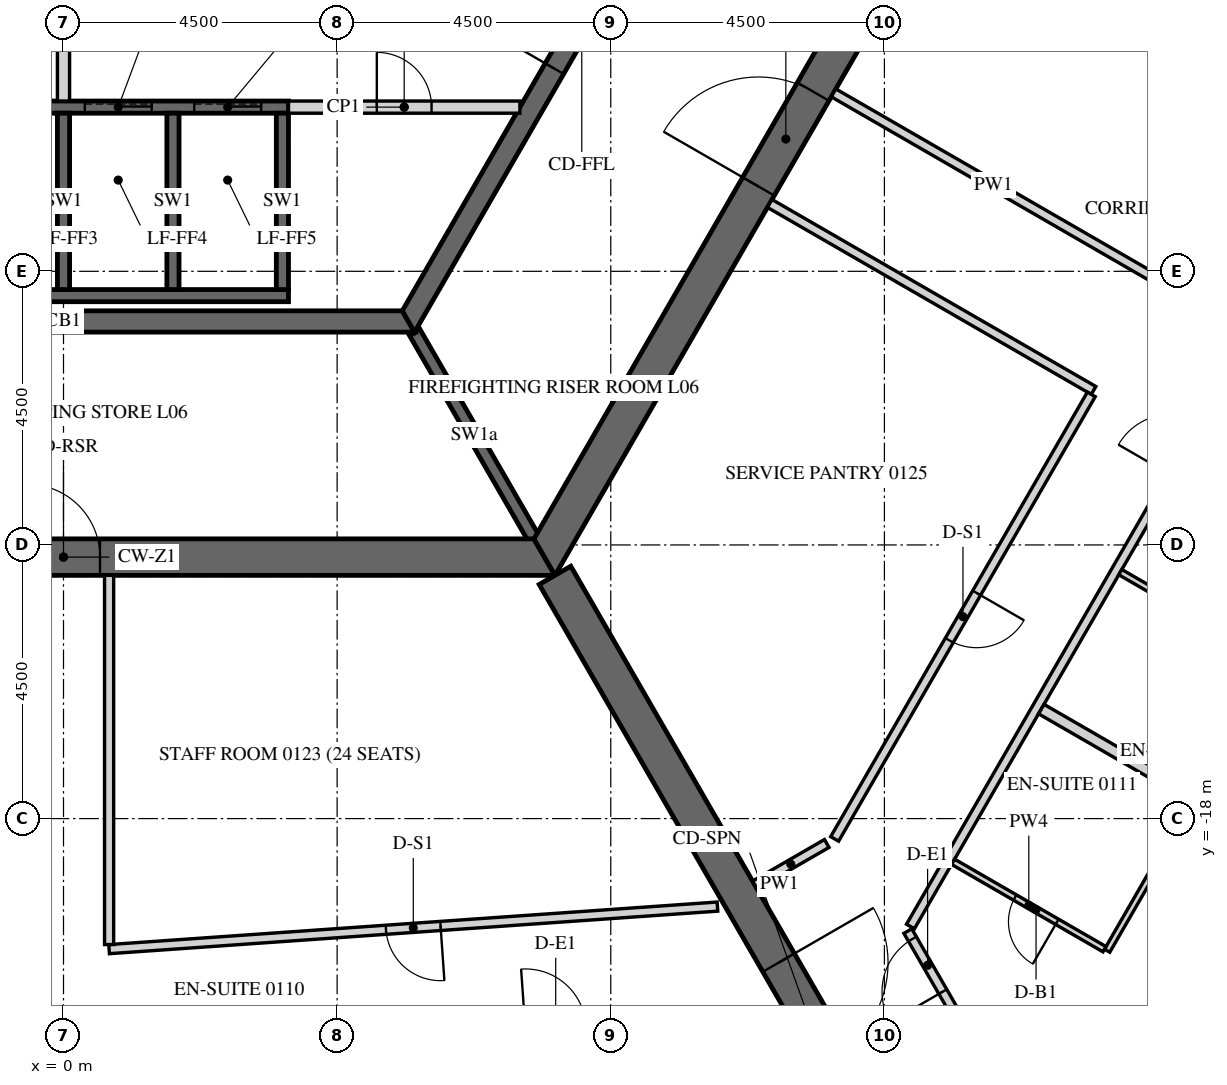
"""IFC4 building model, lengths in metres.
Left out: names, types, materials, properties, quantities, classifications, styles, units other than length and angle.
Written with IfcOpenShell. Run it as: python <this file> out.ifc"""

import sys

from ifc_helpers import new_model, si_unit, direction, frame, frame_2d, origin, place, context, subcontext, project, spatial, polyline, rectangle, outline, extrude, element, fill, save


model = new_model("IFC4")
c1 = context("Model", 3, precision=1e-05, world=origin(), true_north=direction((0.0, 1.0)))
c2 = subcontext(c1, "Body", "Model", "MODEL_VIEW")
j1 = project(units=[si_unit("LENGTHUNIT", "METRE"), si_unit("PLANEANGLEUNIT", "RADIAN")], contexts=[c1])
p1 = place(None, origin())
s1 = spatial("IfcSite", under=j1, at=p1, CompositionType="ELEMENT")
p2 = place(p1, origin())
s2 = spatial("IfcBuilding", under=s1, at=p2, CompositionType="ELEMENT")
p3 = place(p2, frame((0.0, 0.0, 37.5)))
s3 = spatial("IfcBuildingStorey", under=s2, at=p3, CompositionType="ELEMENT", Elevation=37.5)
p4 = place(p3, frame((-7.91, -13.7, -0.15), z_axis=(0.0, 0.0, 1.0), x_axis=(1.0, 0.0, 0.0)))
e1 = element("IfcWall", 1, at=p4, inside=s3, PredefinedType="SHEAR", context=c2, shape_type="SweptSolid", body=[
    extrude(outline(polyline([(-0.173, -0.3), (15.993, -0.3), (15.646, 0.3), (0.173, 0.3), (-0.173, -0.3)])), origin(), (0.0, 0.0, 1.0), 3.9),
])
p5 = place(p4, frame((7.31, 0.0, 0.15)))
e2 = element("IfcOpeningElement", 2, at=p5, cuts=e1, PredefinedType="OPENING", context=c2, shape_type="SweptSolid", body=[
    extrude(rectangle(XDim=1.2, YDim=2.4, at=frame_2d((0.6, 1.2))), frame((0.0, 0.31, 0.0), z_axis=(0.0, -1.0, 0.0), x_axis=(1.0, 0.0, 0.0)), (0.0, 0.0, 1.0), 0.62),
])
p6 = place(p3, frame((7.91, -13.7, -0.15), z_axis=(0.0, 0.0, 1.0), x_axis=(0.499999880136, 0.866025472988, 0.0)))
e3 = element("IfcWall", 3, at=p6, inside=s3, PredefinedType="SHEAR", context=c2, shape_type="SweptSolid", body=[
    extrude(outline(polyline([(-0.173, -0.3), (15.993, -0.3), (15.646, 0.3), (0.173, 0.3), (-0.173, -0.3)])), origin(), (0.0, 0.0, 1.0), 3.9),
])
p7 = place(p6, frame((7.039, 0.0, 0.15)))
e4 = element("IfcOpeningElement", 4, at=p7, cuts=e3, PredefinedType="OPENING", context=c2, shape_type="SweptSolid", body=[
    extrude(rectangle(XDim=1.8, YDim=2.4, at=frame_2d((0.9, 1.2))), frame((0.0, 0.31, 0.0), z_axis=(0.0, -1.0, 0.0), x_axis=(1.0, 0.0, 0.0)), (0.0, 0.0, 1.0), 0.62),
])
p8 = place(p3, frame((8.083, -14.0, -0.15), z_axis=(0.0, 0.0, 1.0), x_axis=(0.499997680643, -0.866026742862, 0.0)))
e5 = element("IfcWall", 5, at=p8, inside=s3, PredefinedType="SHEAR", context=c2, shape_type="SweptSolid", body=[
    extrude(rectangle(XDim=16.509, YDim=0.6, at=frame_2d((8.254, 0.0))), origin(), (0.0, 0.0, 1.0), 3.9),
])
p9 = place(p8, frame((7.354, 0.0, 0.15)))
e6 = element("IfcOpeningElement", 6, at=p9, cuts=e5, PredefinedType="OPENING", context=c2, shape_type="SweptSolid", body=[
    extrude(rectangle(XDim=1.8, YDim=2.4, at=frame_2d((0.9, 1.2))), frame((0.0, 0.31, 0.0), z_axis=(0.0, -1.0, 0.0), x_axis=(1.0, 0.0, 0.0)), (0.0, 0.0, 1.0), 0.62),
])
p10 = place(p3, frame((-5.673, -9.825, -0.15), z_axis=(0.0, 0.0, 1.0), x_axis=(1.0, 0.0, 0.0)))
e7 = element("IfcWall", 7, at=p10, inside=s3, PredefinedType="SHEAR", context=c2, shape_type="SweptSolid", body=[
    extrude(outline(polyline([(-0.101, -0.175), (11.446, -0.175), (11.244, 0.175), (0.101, 0.175), (-0.101, -0.175)])), origin(), (0.0, 0.0, 1.0), 3.9),
])
p11 = place(p3, frame((5.673, -9.825, -0.15), z_axis=(0.0, 0.0, 1.0), x_axis=(0.499995046907, 0.866028263435, 0.0)))
e8 = element("IfcWall", 8, at=p11, inside=s3, PredefinedType="SHEAR", context=c2, shape_type="SweptSolid", body=[
    extrude(outline(polyline([(-0.101, -0.175), (11.446, -0.175), (11.244, 0.175), (0.101, 0.175), (-0.101, -0.175)])), origin(), (0.0, 0.0, 1.0), 3.9),
])
p12 = place(p11, frame((4.801, 0.0, 0.15)))
e9 = element("IfcOpeningElement", 9, at=p12, cuts=e8, PredefinedType="OPENING", context=c2, shape_type="SweptSolid", body=[
    extrude(rectangle(XDim=1.8, YDim=2.4, at=frame_2d((0.9, 1.2))), frame((0.0, 0.185, 0.0), z_axis=(0.0, -1.0, 0.0), x_axis=(1.0, 0.0, 0.0)), (0.0, 0.0, 1.0), 0.37),
])
p13 = place(p3, frame((-5.5, -6.3, -0.25), z_axis=(0.0, 0.0, 1.0), x_axis=(1.0, 0.0, 0.0)))
e10 = element("IfcWall", 10, at=p13, inside=s3, PredefinedType="SHEAR", context=c2, shape_type="SweptSolid", body=[
    extrude(rectangle(XDim=9.2, YDim=0.2, at=frame_2d((4.6, 0.0))), origin(), (0.0, 0.0, 1.0), 3.9),
])
p14 = place(p13, frame((0.45, 0.0, 0.25)))
e11 = element("IfcOpeningElement", 11, at=p14, cuts=e10, PredefinedType="OPENING", context=c2, shape_type="SweptSolid", body=[
    extrude(rectangle(XDim=1.1, YDim=2.1, at=frame_2d((0.55, 1.05))), frame((0.0, 0.11, 0.0), z_axis=(0.0, -1.0, 0.0), x_axis=(1.0, 0.0, 0.0)), (0.0, 0.0, 1.0), 0.22),
])
p15 = place(p13, frame((2.25, 0.0, 0.25)))
e12 = element("IfcOpeningElement", 12, at=p15, cuts=e10, PredefinedType="OPENING", context=c2, shape_type="SweptSolid", body=[
    extrude(rectangle(XDim=1.1, YDim=2.1, at=frame_2d((0.55, 1.05))), frame((0.0, 0.11, 0.0), z_axis=(0.0, -1.0, 0.0), x_axis=(1.0, 0.0, 0.0)), (0.0, 0.0, 1.0), 0.22),
])
p16 = place(p13, frame((4.05, 0.0, 0.25)))
e13 = element("IfcOpeningElement", 13, at=p16, cuts=e10, PredefinedType="OPENING", context=c2, shape_type="SweptSolid", body=[
    extrude(rectangle(XDim=1.1, YDim=2.1, at=frame_2d((0.55, 1.05))), frame((0.0, 0.11, 0.0), z_axis=(0.0, -1.0, 0.0), x_axis=(1.0, 0.0, 0.0)), (0.0, 0.0, 1.0), 0.22),
])
p17 = place(p13, frame((5.85, 0.0, 0.25)))
e14 = element("IfcOpeningElement", 14, at=p17, cuts=e10, PredefinedType="OPENING", context=c2, shape_type="SweptSolid", body=[
    extrude(rectangle(XDim=1.1, YDim=2.1, at=frame_2d((0.55, 1.05))), frame((0.0, 0.11, 0.0), z_axis=(0.0, -1.0, 0.0), x_axis=(1.0, 0.0, 0.0)), (0.0, 0.0, 1.0), 0.22),
])
p18 = place(p13, frame((7.65, 0.0, 0.25)))
e15 = element("IfcOpeningElement", 15, at=p18, cuts=e10, PredefinedType="OPENING", context=c2, shape_type="SweptSolid", body=[
    extrude(rectangle(XDim=1.1, YDim=2.1, at=frame_2d((0.55, 1.05))), frame((0.0, 0.11, 0.0), z_axis=(0.0, -1.0, 0.0), x_axis=(1.0, 0.0, 0.0)), (0.0, 0.0, 1.0), 0.22),
])
p19 = place(p3, frame((-5.5, -9.4, -0.25), z_axis=(0.0, 0.0, 1.0), x_axis=(1.0, 0.0, 0.0)))
e16 = element("IfcWall", 16, at=p19, inside=s3, PredefinedType="SHEAR", context=c2, shape_type="SweptSolid", body=[
    extrude(rectangle(XDim=9.2, YDim=0.2, at=frame_2d((4.6, 0.0))), origin(), (0.0, 0.0, 1.0), 3.9),
])
for number, where, z_axis, x_axis in (
    (17, (0.0, -9.3, -0.25), (0.0, 0.0, 1.0), (0.0, 1.0, 0.0)),
    (18, (1.8, -9.3, -0.25), (0.0, 0.0, 1.0), (0.0, 1.0, 0.0)),
    (19, (3.6, -9.3, -0.25), (0.0, 0.0, 1.0), (0.0, 1.0, 0.0)),
):
    element("IfcWall", number, at=place(p3, frame(where, z_axis=z_axis, x_axis=x_axis)), inside=s3, PredefinedType="SHEAR", context=c2, shape_type="SweptSolid", body=[
        extrude(rectangle(XDim=2.9, YDim=0.2, at=frame_2d((1.45, 0.0))), origin(), (0.0, 0.0, 1.0), 3.9),
    ])
p20 = place(p3, frame((0.0, -6.2, 0.0), z_axis=(0.0, 0.0, 1.0), x_axis=(0.0, 1.0, 0.0)))
e20 = element("IfcWall", 20, at=p20, inside=s3, PredefinedType="PARTITIONING", context=c2, shape_type="SweptSolid", body=[
    extrude(rectangle(XDim=6.1, YDim=0.2, at=frame_2d((3.05, 0.0))), origin(), (0.0, 0.0, 1.0), 3.65),
])
p21 = place(p3, frame((3.7, -6.3, 0.0), z_axis=(0.0, 0.0, 1.0), x_axis=(1.0, 0.0, 0.0)))
e21 = element("IfcWall", 21, at=p21, inside=s3, PredefinedType="PARTITIONING", context=c2, shape_type="SweptSolid", body=[
    extrude(rectangle(XDim=3.806, YDim=0.2, at=frame_2d((1.903, 0.0))), origin(), (0.0, 0.0, 1.0), 3.65),
])
p22 = place(p21, frame((1.453, 0.0, 0.0)))
e22 = element("IfcOpeningElement", 22, at=p22, cuts=e21, PredefinedType="OPENING", context=c2, shape_type="SweptSolid", body=[
    extrude(rectangle(XDim=0.9, YDim=2.1, at=frame_2d((0.45, 1.05))), frame((0.0, 0.11, 0.0), z_axis=(0.0, -1.0, 0.0), x_axis=(1.0, 0.0, 0.0)), (0.0, 0.0, 1.0), 0.22),
])
p23 = place(p3, frame((5.773, -10.0, -0.15), z_axis=(0.0, 0.0, 1.0), x_axis=(0.500038251005, -0.86600331843, 0.0)))
e23 = element("IfcWall", 23, at=p23, inside=s3, PredefinedType="SHEAR", context=c2, shape_type="SweptSolid", body=[
    extrude(rectangle(XDim=3.926, YDim=0.2, at=frame_2d((1.963, 0.0))), origin(), (0.0, 0.0, 1.0), 3.9),
])
p24 = place(p3, frame((10.754, -19.447, 0.0), z_axis=(0.0, 0.0, 1.0), x_axis=(-0.997564830966, -0.069745308232, 0.0)))
e24 = element("IfcWall", 24, at=p24, inside=s3, PredefinedType="PARTITIONING", context=c2, shape_type="SweptSolid", body=[
    extrude(rectangle(XDim=10.029, YDim=0.15, at=frame_2d((5.014, 0.0))), origin(), (0.0, 0.0, 1.0), 2.988),
])
p25 = place(p24, frame((4.564, 0.0, 0.0)))
e25 = element("IfcOpeningElement", 25, at=p25, cuts=e24, PredefinedType="OPENING", context=c2, shape_type="SweptSolid", body=[
    extrude(rectangle(XDim=0.9, YDim=2.1, at=frame_2d((0.45, 1.05))), frame((0.0, 0.085, 0.0), z_axis=(0.0, -1.0, 0.0), x_axis=(1.0, 0.0, 0.0)), (0.0, 0.0, 1.0), 0.17),
])
p26 = place(p3, frame((0.75, -20.072, 0.0), z_axis=(0.0, 0.0, 1.0), x_axis=(0.0, 1.0, 0.0)))
e26 = element("IfcWall", 26, at=p26, inside=s3, PredefinedType="PARTITIONING", context=c2, shape_type="SweptSolid", body=[
    extrude(rectangle(XDim=6.072, YDim=0.15, at=frame_2d((3.036, 0.0))), origin(), (0.0, 0.0, 1.0), 2.988),
])
p27 = place(p3, frame((15.441, -22.545, 0.0), z_axis=(0.0, 0.0, 1.0), x_axis=(-0.500037089193, 0.86600398927, 0.0)))
e27 = element("IfcWall", 27, at=p27, inside=s3, PredefinedType="PARTITIONING", context=c2, shape_type="SweptSolid", body=[
    extrude(rectangle(XDim=3.112, YDim=0.15, at=frame_2d((1.556, 0.0))), origin(), (0.0, 0.0, 1.0), 2.988),
])
p28 = place(p27, frame((1.962, 0.0, 0.0)))
e28 = element("IfcOpeningElement", 28, at=p28, cuts=e27, PredefinedType="OPENING", context=c2, shape_type="SweptSolid", body=[
    extrude(rectangle(XDim=1.0, YDim=2.1, at=frame_2d((0.5, 1.05))), frame((0.0, 0.085, 0.0), z_axis=(0.0, -1.0, 0.0), x_axis=(1.0, 0.0, 0.0)), (0.0, 0.0, 1.0), 0.17),
])
p29 = place(p3, frame((13.928, -19.775, 0.0), z_axis=(0.0, 0.0, 1.0), x_axis=(0.50000450071, 0.866022805283, 0.0)))
e29 = element("IfcWall", 29, at=p29, inside=s3, PredefinedType="PARTITIONING", context=c2, shape_type="SweptSolid", body=[
    extrude(rectangle(XDim=23.877, YDim=0.15, at=frame_2d((11.938, 0.0))), origin(), (0.0, 0.0, 1.0), 2.988),
])
p30 = place(p29, frame((8.573, 0.0, 0.0)))
e30 = element("IfcOpeningElement", 30, at=p30, cuts=e29, PredefinedType="OPENING", context=c2, shape_type="SweptSolid", body=[
    extrude(rectangle(XDim=1.0, YDim=2.1, at=frame_2d((0.5, 1.05))), frame((0.0, 0.085, 0.0), z_axis=(0.0, -1.0, 0.0), x_axis=(1.0, 0.0, 0.0)), (0.0, 0.0, 1.0), 0.17),
])
p31 = place(p29, frame((13.022, 0.0, 0.0)))
e31 = element("IfcOpeningElement", 31, at=p31, cuts=e29, PredefinedType="OPENING", context=c2, shape_type="SweptSolid", body=[
    extrude(rectangle(XDim=1.0, YDim=2.1, at=frame_2d((0.5, 1.05))), frame((0.0, 0.085, 0.0), z_axis=(0.0, -1.0, 0.0), x_axis=(1.0, 0.0, 0.0)), (0.0, 0.0, 1.0), 0.17),
])
p32 = place(p29, frame((21.925, 0.0, 0.0)))
e32 = element("IfcOpeningElement", 32, at=p32, cuts=e29, PredefinedType="OPENING", context=c2, shape_type="SweptSolid", body=[
    extrude(rectangle(XDim=1.0, YDim=2.1, at=frame_2d((0.5, 1.05))), frame((0.0, 0.085, 0.0), z_axis=(0.0, -1.0, 0.0), x_axis=(1.0, 0.0, 0.0)), (0.0, 0.0, 1.0), 0.17),
])
p33 = place(p3, frame((17.925, -9.103, 0.0), z_axis=(0.0, 0.0, 1.0), x_axis=(-0.866013586754, 0.500020467139, 0.0)))
e33 = element("IfcWall", 33, at=p33, inside=s3, PredefinedType="PARTITIONING", context=c2, shape_type="SweptSolid", body=[
    extrude(rectangle(XDim=6.075, YDim=0.15, at=frame_2d((3.038, 0.0))), origin(), (0.0, 0.0, 1.0), 2.988),
])
p34 = place(p3, frame((11.614, -7.884, 0.0), z_axis=(0.0, 0.0, 1.0), x_axis=(0.866033542371, -0.499985903289, 0.0)))
e34 = element("IfcWall", 34, at=p34, inside=s3, PredefinedType="PARTITIONING", context=c2, shape_type="SweptSolid", body=[
    extrude(rectangle(XDim=6.15, YDim=0.15, at=frame_2d((3.075, 0.0))), origin(), (0.0, 0.0, 1.0), 2.988),
])
p35 = place(p3, frame((16.902, -11.024, 0.0), z_axis=(0.0, 0.0, 1.0), x_axis=(-0.499999527968, -0.866025676312, 0.0)))
e35 = element("IfcWall", 35, at=p35, inside=s3, PredefinedType="PARTITIONING", context=c2, shape_type="SweptSolid", body=[
    extrude(rectangle(XDim=8.441, YDim=0.15, at=frame_2d((4.22, 0.0))), origin(), (0.0, 0.0, 1.0), 2.988),
])
p36 = place(p35, frame((3.771, 0.0, 0.0)))
e36 = element("IfcOpeningElement", 36, at=p36, cuts=e35, PredefinedType="OPENING", context=c2, shape_type="SweptSolid", body=[
    extrude(rectangle(XDim=0.9, YDim=2.1, at=frame_2d((0.45, 1.05))), frame((0.0, 0.085, 0.0), z_axis=(0.0, -1.0, 0.0), x_axis=(1.0, 0.0, 0.0)), (0.0, 0.0, 1.0), 0.17),
])
p37 = place(p3, frame((12.552, -18.409, 0.0), z_axis=(0.0, 0.0, 1.0), x_axis=(-0.866078408764, -0.499908181442, 0.0)))
e37 = element("IfcWall", 37, at=p37, inside=s3, PredefinedType="PARTITIONING", context=c2, shape_type="SweptSolid", body=[
    extrude(rectangle(XDim=1.365, YDim=0.15, at=frame_2d((0.683, 0.0))), origin(), (0.0, 0.0, 1.0), 2.988),
])
p38 = place(p3, frame((18.568, -17.74, 0.0), z_axis=(0.0, 0.0, 1.0), x_axis=(-0.499998209175, -0.866026437715, 0.0)))
e38 = element("IfcWall", 38, at=p38, inside=s3, PredefinedType="PARTITIONING", context=c2, shape_type="SweptSolid", body=[
    extrude(rectangle(XDim=2.81, YDim=0.1, at=frame_2d((1.405, 0.0))), origin(), (0.0, 0.0, 1.0), 2.988),
])
p39 = place(p3, frame((17.12, -20.148, 0.0), z_axis=(0.0, 0.0, 1.0), x_axis=(-0.866039941686, 0.499974818771, 0.0)))
e39 = element("IfcWall", 39, at=p39, inside=s3, PredefinedType="PARTITIONING", context=c2, shape_type="SweptSolid", body=[
    extrude(rectangle(XDim=2.875, YDim=0.1, at=frame_2d((1.438, 0.0))), origin(), (0.0, 0.0, 1.0), 2.988),
])
p40 = place(p39, frame((0.9, 0.0, 0.0)))
e40 = element("IfcOpeningElement", 40, at=p40, cuts=e39, PredefinedType="OPENING", context=c2, shape_type="SweptSolid", body=[
    extrude(rectangle(XDim=0.8, YDim=2.1, at=frame_2d((0.4, 1.05))), frame((0.0, 0.06, 0.0), z_axis=(0.0, -1.0, 0.0), x_axis=(1.0, 0.0, 0.0)), (0.0, 0.0, 1.0), 0.12),
])
p41 = place(p3, frame((22.51, -19.912, 0.0), z_axis=(0.0, 0.0, 1.0), x_axis=(-0.866014745021, 0.500018461065, 0.0)))
e41 = element("IfcWall", 41, at=p41, inside=s3, PredefinedType="PARTITIONING", context=c2, shape_type="SweptSolid", body=[
    extrude(rectangle(XDim=7.425, YDim=0.18, at=frame_2d((3.712, 0.0))), origin(), (0.0, 0.0, 1.0), 2.988),
])
p42 = place(p3, frame((17.38, -13.948, 0.0), z_axis=(0.0, 0.0, 1.0), x_axis=(0.866039067339, -0.499976333282, 0.0)))
e42 = element("IfcWall", 42, at=p42, inside=s3, PredefinedType="PARTITIONING", context=c2, shape_type="SweptSolid", body=[
    extrude(rectangle(XDim=2.525, YDim=0.1, at=frame_2d((1.262, 0.0))), origin(), (0.0, 0.0, 1.0), 2.988),
])
p43 = place(p42, frame((0.955, 0.0, 0.0)))
e43 = element("IfcOpeningElement", 43, at=p43, cuts=e42, PredefinedType="OPENING", context=c2, shape_type="SweptSolid", body=[
    extrude(rectangle(XDim=0.8, YDim=2.1, at=frame_2d((0.4, 1.05))), frame((0.0, 0.06, 0.0), z_axis=(0.0, -1.0, 0.0), x_axis=(1.0, 0.0, 0.0)), (0.0, 0.0, 1.0), 0.12),
])
p44 = place(p7, origin())
e44 = element("IfcDoor", 44, at=p44, inside=s3, OperationType="DOUBLE_DOOR_SINGLE_SWING", PredefinedType="DOOR", context=c2, shape_type="SweptSolid", body=[
    extrude(rectangle(XDim=1.8, YDim=2.4, at=frame_2d((0.9, 1.2))), frame((0.0, 0.025, 0.0), z_axis=(0.0, -1.0, 0.0), x_axis=(1.0, 0.0, 0.0)), (0.0, 0.0, 1.0), 0.05),
])
fill(e4, e44)
p45 = place(p5, origin())
e45 = element("IfcDoor", 45, at=p45, inside=s3, OperationType="SINGLE_SWING_LEFT", PredefinedType="DOOR", context=c2, shape_type="SweptSolid", body=[
    extrude(rectangle(XDim=1.2, YDim=2.4, at=frame_2d((0.6, 1.2))), frame((0.0, 0.025, 0.0), z_axis=(0.0, -1.0, 0.0), x_axis=(1.0, 0.0, 0.0)), (0.0, 0.0, 1.0), 0.05),
])
fill(e2, e45)
p46 = place(p9, origin())
e46 = element("IfcDoor", 46, at=p46, inside=s3, OperationType="DOUBLE_DOOR_SINGLE_SWING", PredefinedType="DOOR", context=c2, shape_type="SweptSolid", body=[
    extrude(rectangle(XDim=1.8, YDim=2.4, at=frame_2d((0.9, 1.2))), frame((0.0, 0.025, 0.0), z_axis=(0.0, -1.0, 0.0), x_axis=(1.0, 0.0, 0.0)), (0.0, 0.0, 1.0), 0.05),
])
fill(e6, e46)
p47 = place(p12, origin())
e47 = element("IfcDoor", 47, at=p47, inside=s3, OperationType="DOUBLE_DOOR_SINGLE_SWING", PredefinedType="DOOR", context=c2, shape_type="SweptSolid", body=[
    extrude(rectangle(XDim=1.8, YDim=2.4, at=frame_2d((0.9, 1.2))), frame((0.0, 0.025, 0.0), z_axis=(0.0, -1.0, 0.0), x_axis=(1.0, 0.0, 0.0)), (0.0, 0.0, 1.0), 0.05),
])
fill(e9, e47)
p48 = place(p22, origin())
e48 = element("IfcDoor", 48, at=p48, inside=s3, OperationType="SINGLE_SWING_LEFT", PredefinedType="DOOR", context=c2, shape_type="SweptSolid", body=[
    extrude(rectangle(XDim=0.9, YDim=2.1, at=frame_2d((0.45, 1.05))), frame((0.0, 0.025, 0.0), z_axis=(0.0, -1.0, 0.0), x_axis=(1.0, 0.0, 0.0)), (0.0, 0.0, 1.0), 0.05),
])
fill(e22, e48)
p49 = place(p17, origin())
e49 = element("IfcDoor", 49, at=p49, inside=s3, OperationType="SLIDING_TO_LEFT", PredefinedType="DOOR", context=c2, shape_type="SweptSolid", body=[
    extrude(rectangle(XDim=1.1, YDim=2.1, at=frame_2d((0.55, 1.05))), frame((0.0, 0.025, 0.0), z_axis=(0.0, -1.0, 0.0), x_axis=(1.0, 0.0, 0.0)), (0.0, 0.0, 1.0), 0.05),
])
fill(e14, e49)
p50 = place(p18, origin())
e50 = element("IfcDoor", 50, at=p50, inside=s3, OperationType="SLIDING_TO_LEFT", PredefinedType="DOOR", context=c2, shape_type="SweptSolid", body=[
    extrude(rectangle(XDim=1.1, YDim=2.1, at=frame_2d((0.55, 1.05))), frame((0.0, 0.025, 0.0), z_axis=(0.0, -1.0, 0.0), x_axis=(1.0, 0.0, 0.0)), (0.0, 0.0, 1.0), 0.05),
])
fill(e15, e50)
p51 = place(p28, origin())
e51 = element("IfcDoor", 51, at=p51, inside=s3, OperationType="SINGLE_SWING_LEFT", PredefinedType="DOOR", context=c2, shape_type="SweptSolid", body=[
    extrude(rectangle(XDim=1.0, YDim=2.1, at=frame_2d((0.5, 1.05))), frame((0.0, 0.025, 0.0), z_axis=(0.0, -1.0, 0.0), x_axis=(1.0, 0.0, 0.0)), (0.0, 0.0, 1.0), 0.05),
])
fill(e28, e51)
p52 = place(p40, origin())
e52 = element("IfcDoor", 52, at=p52, inside=s3, OperationType="SINGLE_SWING_RIGHT", PredefinedType="DOOR", context=c2, shape_type="SweptSolid", body=[
    extrude(rectangle(XDim=0.8, YDim=2.1, at=frame_2d((0.4, 1.05))), frame((0.0, 0.025, 0.0), z_axis=(0.0, -1.0, 0.0), x_axis=(1.0, 0.0, 0.0)), (0.0, 0.0, 1.0), 0.05),
])
fill(e40, e52)
p53 = place(p25, origin())
e53 = element("IfcDoor", 53, at=p53, inside=s3, OperationType="SINGLE_SWING_LEFT", PredefinedType="DOOR", context=c2, shape_type="SweptSolid", body=[
    extrude(rectangle(XDim=0.9, YDim=2.1, at=frame_2d((0.45, 1.05))), frame((0.0, 0.025, 0.0), z_axis=(0.0, -1.0, 0.0), x_axis=(1.0, 0.0, 0.0)), (0.0, 0.0, 1.0), 0.05),
])
fill(e25, e53)
p54 = place(p36, origin())
e54 = element("IfcDoor", 54, at=p54, inside=s3, OperationType="SINGLE_SWING_RIGHT", PredefinedType="DOOR", context=c2, shape_type="SweptSolid", body=[
    extrude(rectangle(XDim=0.9, YDim=2.1, at=frame_2d((0.45, 1.05))), frame((0.0, 0.025, 0.0), z_axis=(0.0, -1.0, 0.0), x_axis=(1.0, 0.0, 0.0)), (0.0, 0.0, 1.0), 0.05),
])
fill(e36, e54)
save(model, sys.argv[1])
